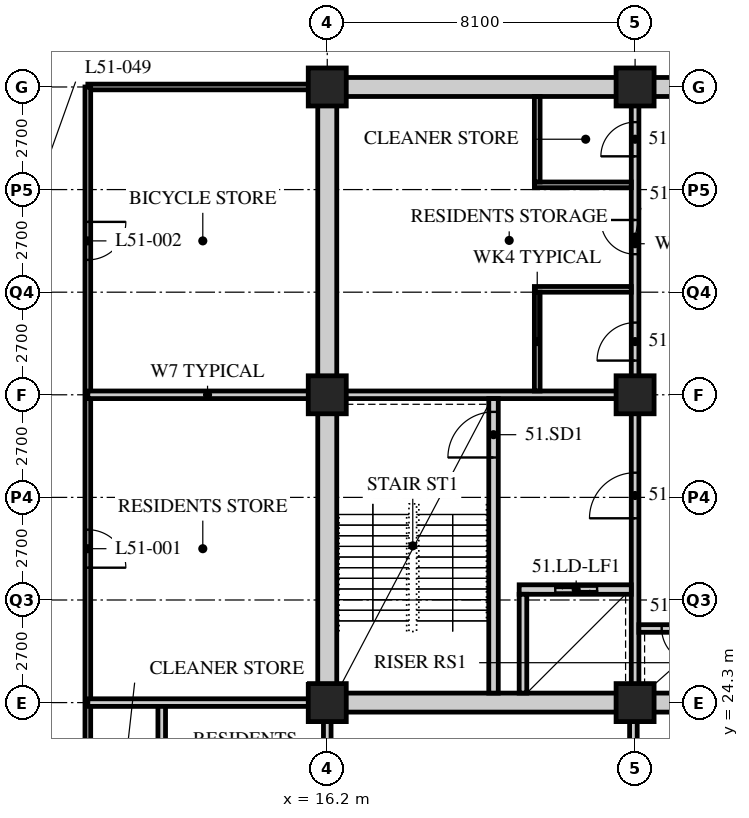
"""IFC4 building model, lengths in metres.
Left out: names, types, materials, properties, quantities, classifications, styles, units other than length and angle.
Written with IfcOpenShell. Run it as: python <this file> out.ifc"""

import sys

from ifc_helpers import new_model, si_unit, direction, frame, frame_2d, origin, origin_2d, place, context, subcontext, project, spatial, rectangle, hollow_rectangle, extrude, element, fill, save


model = new_model("IFC4")
c1 = context("Model", 3, precision=1e-05, world=origin(), true_north=direction((0.0, 1.0)))
c2 = subcontext(c1, "Body", "Model", "MODEL_VIEW")
j1 = project(units=[si_unit("LENGTHUNIT", "METRE"), si_unit("PLANEANGLEUNIT", "RADIAN")], contexts=[c1])
p1 = place(None, origin())
s1 = spatial("IfcSite", under=j1, at=p1, CompositionType="ELEMENT")
p2 = place(p1, origin())
s2 = spatial("IfcBuilding", under=s1, at=p2, CompositionType="ELEMENT")
p3 = place(p2, frame((0.0, 0.0, 199.2)))
s3 = spatial("IfcBuildingStorey", under=s2, at=p3, CompositionType="ELEMENT", Elevation=199.2)
for number, where, z_axis, x_axis in (
    (1, (16.2, 24.3, 0.0), (0.0, 0.0, 1.0), (1.0, 0.0, 0.0)),
    (2, (16.2, 32.4, 0.0), (0.0, 0.0, 1.0), (1.0, 0.0, 0.0)),
    (3, (16.2, 40.5, 0.0), (0.0, 0.0, 1.0), (1.0, 0.0, 0.0)),
    (4, (24.3, 24.3, 0.0), (0.0, 0.0, 1.0), (1.0, 0.0, 0.0)),
    (5, (24.3, 32.4, 0.0), (0.0, 0.0, 1.0), (1.0, 0.0, 0.0)),
    (6, (24.3, 40.5, 0.0), (0.0, 0.0, 1.0), (1.0, 0.0, 0.0)),
):
    element("IfcColumn", number, at=place(p3, frame(where, z_axis=z_axis, x_axis=x_axis)), inside=s3, PredefinedType="COLUMN", context=c2, shape_type="SweptSolid", body=[
        extrude(hollow_rectangle(XDim=1.0, YDim=1.0, WallThickness=0.1, at=origin_2d()), origin(), (0.0, 0.0, 1.0), 3.6),
    ])
p4 = place(p3, frame((16.0, 40.5, 0.0), z_axis=(0.0, 0.0, 1.0), x_axis=(-1.0, 0.0, 0.0)))
e7 = element("IfcWall", 7, at=p4, inside=s3, PredefinedType="PARTITIONING", context=c2, shape_type="SweptSolid", body=[
    extrude(rectangle(XDim=6.1, YDim=0.15, at=frame_2d((3.05, 0.0))), origin(), (0.0, 0.0, 1.0), 3.39),
])
p5 = place(p3, frame((9.9, 40.5, 0.0), z_axis=(0.0, 0.0, 1.0), x_axis=(0.0, -1.0, 0.0)))
e8 = element("IfcWall", 8, at=p5, inside=s3, PredefinedType="PARTITIONING", context=c2, shape_type="SweptSolid", body=[
    extrude(rectangle(XDim=19.8, YDim=0.15, at=frame_2d((9.9, 0.0))), origin(), (0.0, 0.0, 1.0), 3.39),
])
p6 = place(p5, frame((11.65, 0.0, 0.0)))
e9 = element("IfcOpeningElement", 9, at=p6, cuts=e8, PredefinedType="OPENING", context=c2, shape_type="SweptSolid", body=[
    extrude(rectangle(XDim=1.0, YDim=2.1, at=frame_2d((0.5, 1.05))), frame((0.0, 0.085, 0.0), z_axis=(0.0, -1.0, 0.0), x_axis=(1.0, 0.0, 0.0)), (0.0, 0.0, 1.0), 0.17),
])
p7 = place(p5, frame((3.55, 0.0, 0.0)))
e10 = element("IfcOpeningElement", 10, at=p7, cuts=e8, PredefinedType="OPENING", context=c2, shape_type="SweptSolid", body=[
    extrude(rectangle(XDim=1.0, YDim=2.1, at=frame_2d((0.5, 1.05))), frame((0.0, 0.085, 0.0), z_axis=(0.0, -1.0, 0.0), x_axis=(1.0, 0.0, 0.0)), (0.0, 0.0, 1.0), 0.17),
])
p8 = place(p3, frame((9.9, 32.4, 0.0), z_axis=(0.0, 0.0, 1.0), x_axis=(1.0, 0.0, 0.0)))
e11 = element("IfcWall", 11, at=p8, inside=s3, PredefinedType="SOLIDWALL", context=c2, shape_type="SweptSolid", body=[
    extrude(rectangle(XDim=6.3, YDim=0.2, at=frame_2d((3.15, 0.0))), origin(), (0.0, 0.0, 1.0), 3.39),
])
p9 = place(p3, frame((16.2, 20.7, 0.0), z_axis=(0.0, 0.0, 1.0), x_axis=(0.0, 1.0, 0.0)))
e12 = element("IfcWall", 12, at=p9, inside=s3, PredefinedType="SOLIDWALL", context=c2, shape_type="SweptSolid", body=[
    extrude(rectangle(XDim=3.6, YDim=0.2, at=frame_2d((1.8, 0.0))), origin(), (0.0, 0.0, 1.0), 2.778),
])
p10 = place(p3, frame((11.844, 20.7, 0.0), z_axis=(0.0, 0.0, 1.0), x_axis=(0.0, 1.0, 0.0)))
e13 = element("IfcWall", 13, at=p10, inside=s3, PredefinedType="SOLIDWALL", context=c2, shape_type="SweptSolid", body=[
    extrude(rectangle(XDim=3.6, YDim=0.2, at=frame_2d((1.8, 0.0))), origin(), (0.0, 0.0, 1.0), 3.39),
])
p11 = place(p3, frame((24.256, 20.7, 0.0), z_axis=(0.0, 0.0, 1.0), x_axis=(0.0, 1.0, 0.0)))
e14 = element("IfcWall", 14, at=p11, inside=s3, PredefinedType="SOLIDWALL", context=c2, shape_type="SweptSolid", body=[
    extrude(rectangle(XDim=3.6, YDim=0.2, at=frame_2d((1.8, 0.0))), origin(), (0.0, 0.0, 1.0), 2.778),
])
p12 = place(p3, frame((9.9, 24.3, 0.0), z_axis=(0.0, 0.0, 1.0), x_axis=(1.0, 0.0, 0.0)))
e15 = element("IfcWall", 15, at=p12, inside=s3, PredefinedType="SOLIDWALL", context=c2, shape_type="SweptSolid", body=[
    extrude(rectangle(XDim=6.3, YDim=0.2, at=frame_2d((3.15, 0.0))), origin(), (0.0, 0.0, 1.0), 3.39),
])
p13 = place(p3, frame((15.95, 24.3, 0.0), z_axis=(0.0, 0.0, 1.0), x_axis=(1.0, 0.0, 0.0)))
e16 = element("IfcWall", 16, at=p13, inside=s3, PredefinedType="SOLIDWALL", context=c2, shape_type="SweptSolid", body=[
    extrude(rectangle(XDim=24.8, YDim=0.5, at=frame_2d((12.4, 0.0))), origin(), (0.0, 0.0, 1.0), 2.74),
])
p14 = place(p13, frame((11.5, 0.0, 0.0)))
e17 = element("IfcOpeningElement", 17, at=p14, cuts=e16, PredefinedType="OPENING", context=c2, shape_type="SweptSolid", body=[
    extrude(rectangle(XDim=1.8, YDim=2.4, at=frame_2d((0.9, 1.2))), frame((0.0, 0.26, 0.0), z_axis=(0.0, -1.0, 0.0), x_axis=(1.0, 0.0, 0.0)), (0.0, 0.0, 1.0), 0.52),
])
p15 = place(p3, frame((15.95, 40.5, 0.0), z_axis=(0.0, 0.0, 1.0), x_axis=(1.0, 0.0, 0.0)))
e18 = element("IfcWall", 18, at=p15, inside=s3, PredefinedType="SOLIDWALL", context=c2, shape_type="SweptSolid", body=[
    extrude(rectangle(XDim=24.8, YDim=0.5, at=frame_2d((12.4, 0.0))), origin(), (0.0, 0.0, 1.0), 2.74),
])
p16 = place(p15, frame((11.5, 0.0, 0.0)))
e19 = element("IfcOpeningElement", 19, at=p16, cuts=e18, PredefinedType="OPENING", context=c2, shape_type="SweptSolid", body=[
    extrude(rectangle(XDim=1.8, YDim=2.4, at=frame_2d((0.9, 1.2))), frame((0.0, 0.26, 0.0), z_axis=(0.0, -1.0, 0.0), x_axis=(1.0, 0.0, 0.0)), (0.0, 0.0, 1.0), 0.52),
])
p17 = place(p3, frame((16.2, 24.55, 0.0), z_axis=(0.0, 0.0, 1.0), x_axis=(0.0, 1.0, 0.0)))
e20 = element("IfcWall", 20, at=p17, inside=s3, PredefinedType="SOLIDWALL", context=c2, shape_type="SweptSolid", body=[
    extrude(rectangle(XDim=15.7, YDim=0.5, at=frame_2d((7.85, 0.0))), origin(), (0.0, 0.0, 1.0), 2.778),
])
p18 = place(p3, frame((16.45, 32.4, 0.0), z_axis=(0.0, 0.0, 1.0), x_axis=(1.0, 0.0, 0.0)))
e21 = element("IfcWall", 21, at=p18, inside=s3, PredefinedType="SOLIDWALL", context=c2, shape_type="SweptSolid", body=[
    extrude(rectangle(XDim=7.95, YDim=0.2, at=frame_2d((3.975, 0.0))), origin(), (0.0, 0.0, 1.0), 2.778),
])
p19 = place(p3, frame((24.3, 24.55, 0.0), z_axis=(0.0, 0.0, 1.0), x_axis=(0.0, 1.0, 0.0)))
e22 = element("IfcWall", 22, at=p19, inside=s3, PredefinedType="SOLIDWALL", context=c2, shape_type="SweptSolid", body=[
    extrude(rectangle(XDim=7.75, YDim=0.2, at=frame_2d((3.875, 0.0))), origin(), (0.0, 0.0, 1.0), 2.778),
])
p20 = place(p19, frame((4.6, 0.0, 0.0)))
e23 = element("IfcOpeningElement", 23, at=p20, cuts=e22, PredefinedType="OPENING", context=c2, shape_type="SweptSolid", body=[
    extrude(rectangle(XDim=1.2, YDim=2.1, at=frame_2d((0.6, 1.05))), frame((0.0, 0.11, 0.0), z_axis=(0.0, -1.0, 0.0), x_axis=(1.0, 0.0, 0.0)), (0.0, 0.0, 1.0), 0.22),
])
p21 = place(p3, frame((20.575, 24.55, 0.0), z_axis=(0.0, 0.0, 1.0), x_axis=(0.0, 1.0, 0.0)))
e24 = element("IfcWall", 24, at=p21, inside=s3, PredefinedType="SOLIDWALL", context=c2, shape_type="SweptSolid", body=[
    extrude(rectangle(XDim=7.75, YDim=0.25, at=frame_2d((3.875, 0.0))), origin(), (0.0, 0.0, 1.0), 3.39),
])
p22 = place(p21, frame((6.2, 0.0, 0.0)))
e25 = element("IfcOpeningElement", 25, at=p22, cuts=e24, PredefinedType="OPENING", context=c2, shape_type="SweptSolid", body=[
    extrude(rectangle(XDim=1.2, YDim=2.1, at=frame_2d((0.6, 1.05))), frame((0.0, 0.135, 0.0), z_axis=(0.0, -1.0, 0.0), x_axis=(1.0, 0.0, 0.0)), (0.0, 0.0, 1.0), 0.27),
])
p23 = place(p3, frame((21.25, 27.275, 0.0), z_axis=(0.0, 0.0, 1.0), x_axis=(1.0, 0.0, 0.0)))
e26 = element("IfcWall", 26, at=p23, inside=s3, PredefinedType="SOLIDWALL", context=c2, shape_type="SweptSolid", body=[
    extrude(rectangle(XDim=2.95, YDim=0.25, at=frame_2d((1.475, 0.0))), origin(), (0.0, 0.0, 1.0), 3.39),
])
p24 = place(p23, frame((0.95, 0.0, 0.0)))
e27 = element("IfcOpeningElement", 27, at=p24, cuts=e26, PredefinedType="OPENING", context=c2, shape_type="SweptSolid", body=[
    extrude(rectangle(XDim=1.1, YDim=2.4, at=frame_2d((0.55, 1.2))), frame((0.0, 0.135, 0.0), z_axis=(0.0, -1.0, 0.0), x_axis=(1.0, 0.0, 0.0)), (0.0, 0.0, 1.0), 0.27),
])
p25 = place(p3, frame((21.35, 24.55, 0.0), z_axis=(0.0, 0.0, 1.0), x_axis=(0.0, 1.0, 0.0)))
e28 = element("IfcWall", 28, at=p25, inside=s3, PredefinedType="SOLIDWALL", context=c2, shape_type="SweptSolid", body=[
    extrude(rectangle(XDim=2.6, YDim=0.2, at=frame_2d((1.3, 0.0))), origin(), (0.0, 0.0, 1.0), 3.39),
])
p26 = place(p3, frame((24.4, 26.25, 0.0), z_axis=(0.0, 0.0, 1.0), x_axis=(1.0, 0.0, 0.0)))
e29 = element("IfcWall", 29, at=p26, inside=s3, PredefinedType="SOLIDWALL", context=c2, shape_type="SweptSolid", body=[
    extrude(rectangle(XDim=2.15, YDim=0.2, at=frame_2d((1.075, 0.0))), origin(), (0.0, 0.0, 1.0), 3.39),
])
p27 = place(p26, frame((0.6, 0.0, 0.0)))
e30 = element("IfcOpeningElement", 30, at=p27, cuts=e29, PredefinedType="OPENING", context=c2, shape_type="SweptSolid", body=[
    extrude(rectangle(XDim=0.9, YDim=2.1, at=frame_2d((0.45, 1.05))), frame((0.0, 0.11, 0.0), z_axis=(0.0, -1.0, 0.0), x_axis=(1.0, 0.0, 0.0)), (0.0, 0.0, 1.0), 0.22),
])
p28 = place(p3, frame((24.3, 32.5, 0.0), z_axis=(0.0, 0.0, 1.0), x_axis=(0.0, 1.0, 0.0)))
e31 = element("IfcWall", 31, at=p28, inside=s3, PredefinedType="PARTITIONING", context=c2, shape_type="SweptSolid", body=[
    extrude(rectangle(XDim=7.75, YDim=0.2, at=frame_2d((3.875, 0.0))), origin(), (0.0, 0.0, 1.0), 2.778),
])
p29 = place(p28, frame((0.8, 0.0, 0.0)))
e32 = element("IfcOpeningElement", 32, at=p29, cuts=e31, PredefinedType="OPENING", context=c2, shape_type="SweptSolid", body=[
    extrude(rectangle(XDim=1.0, YDim=2.1, at=frame_2d((0.5, 1.05))), frame((0.0, 0.11, 0.0), z_axis=(0.0, -1.0, 0.0), x_axis=(1.0, 0.0, 0.0)), (0.0, 0.0, 1.0), 0.22),
])
p30 = place(p28, frame((3.6, 0.0, 0.0)))
e33 = element("IfcOpeningElement", 33, at=p30, cuts=e31, PredefinedType="OPENING", context=c2, shape_type="SweptSolid", body=[
    extrude(rectangle(XDim=0.9, YDim=2.1, at=frame_2d((0.45, 1.05))), frame((0.0, 0.11, 0.0), z_axis=(0.0, -1.0, 0.0), x_axis=(1.0, 0.0, 0.0)), (0.0, 0.0, 1.0), 0.22),
])
p31 = place(p28, frame((6.175, 0.0, 0.0)))
e34 = element("IfcOpeningElement", 34, at=p31, cuts=e31, PredefinedType="OPENING", context=c2, shape_type="SweptSolid", body=[
    extrude(rectangle(XDim=0.9, YDim=2.1, at=frame_2d((0.45, 1.05))), frame((0.0, 0.11, 0.0), z_axis=(0.0, -1.0, 0.0), x_axis=(1.0, 0.0, 0.0)), (0.0, 0.0, 1.0), 0.22),
])
for number, where, z_axis, x_axis in (
    (35, (21.65, 35.175, 0.0), (0.0, 0.0, 1.0), (1.0, 0.0, 0.0)),
    (36, (21.65, 37.925, 0.0), (0.0, 0.0, 1.0), (1.0, 0.0, 0.0)),
):
    element("IfcWall", number, at=place(p3, frame(where, z_axis=z_axis, x_axis=x_axis)), inside=s3, PredefinedType="PARTITIONING", context=c2, shape_type="SweptSolid", body=[
        extrude(rectangle(XDim=2.55, YDim=0.15, at=frame_2d((1.275, 0.0))), origin(), (0.0, 0.0, 1.0), 3.39),
    ])
p32 = place(p3, frame((21.725, 32.5, 0.0), z_axis=(0.0, 0.0, 1.0), x_axis=(0.0, 1.0, 0.0)))
e37 = element("IfcWall", 37, at=p32, inside=s3, PredefinedType="PARTITIONING", context=c2, shape_type="SweptSolid", body=[
    extrude(rectangle(XDim=2.6, YDim=0.15, at=frame_2d((1.3, 0.0))), origin(), (0.0, 0.0, 1.0), 3.39),
])
p33 = place(p3, frame((21.725, 38.0, 0.0), z_axis=(0.0, 0.0, 1.0), x_axis=(0.0, 1.0, 0.0)))
e38 = element("IfcWall", 38, at=p33, inside=s3, PredefinedType="PARTITIONING", context=c2, shape_type="SweptSolid", body=[
    extrude(rectangle(XDim=2.25, YDim=0.15, at=frame_2d((1.125, 0.0))), origin(), (0.0, 0.0, 1.0), 3.39),
])
p34 = place(p6, origin())
e39 = element("IfcDoor", 39, at=p34, inside=s3, OperationType="SINGLE_SWING_RIGHT", PredefinedType="DOOR", context=c2, shape_type="SweptSolid", body=[
    extrude(rectangle(XDim=1.0, YDim=2.1, at=frame_2d((0.5, 1.05))), frame((0.0, 0.025, 0.0), z_axis=(0.0, -1.0, 0.0), x_axis=(1.0, 0.0, 0.0)), (0.0, 0.0, 1.0), 0.05),
])
fill(e9, e39)
p35 = place(p7, origin())
e40 = element("IfcDoor", 40, at=p35, inside=s3, OperationType="SINGLE_SWING_LEFT", PredefinedType="DOOR", context=c2, shape_type="SweptSolid", body=[
    extrude(rectangle(XDim=1.0, YDim=2.1, at=frame_2d((0.5, 1.05))), frame((0.0, 0.025, 0.0), z_axis=(0.0, -1.0, 0.0), x_axis=(1.0, 0.0, 0.0)), (0.0, 0.0, 1.0), 0.05),
])
fill(e10, e40)
p36 = place(p29, origin())
e41 = element("IfcDoor", 41, at=p36, inside=s3, OperationType="SINGLE_SWING_LEFT", PredefinedType="DOOR", context=c2, shape_type="SweptSolid", body=[
    extrude(rectangle(XDim=1.0, YDim=2.1, at=frame_2d((0.5, 1.05))), frame((0.0, 0.025, 0.0), z_axis=(0.0, -1.0, 0.0), x_axis=(1.0, 0.0, 0.0)), (0.0, 0.0, 1.0), 0.05),
])
fill(e32, e41)
p37 = place(p30, origin())
e42 = element("IfcDoor", 42, at=p37, inside=s3, OperationType="SINGLE_SWING_RIGHT", PredefinedType="DOOR", context=c2, shape_type="SweptSolid", body=[
    extrude(rectangle(XDim=0.9, YDim=2.1, at=frame_2d((0.45, 1.05))), frame((0.0, 0.025, 0.0), z_axis=(0.0, -1.0, 0.0), x_axis=(1.0, 0.0, 0.0)), (0.0, 0.0, 1.0), 0.05),
])
fill(e33, e42)
p38 = place(p31, origin())
e43 = element("IfcDoor", 43, at=p38, inside=s3, OperationType="SINGLE_SWING_LEFT", PredefinedType="DOOR", context=c2, shape_type="SweptSolid", body=[
    extrude(rectangle(XDim=0.9, YDim=2.1, at=frame_2d((0.45, 1.05))), frame((0.0, 0.025, 0.0), z_axis=(0.0, -1.0, 0.0), x_axis=(1.0, 0.0, 0.0)), (0.0, 0.0, 1.0), 0.05),
])
fill(e34, e43)
p39 = place(p22, origin())
e44 = element("IfcDoor", 44, at=p39, inside=s3, OperationType="SINGLE_SWING_LEFT", PredefinedType="DOOR", context=c2, shape_type="SweptSolid", body=[
    extrude(rectangle(XDim=1.2, YDim=2.1, at=frame_2d((0.6, 1.05))), frame((0.0, 0.025, 0.0), z_axis=(0.0, -1.0, 0.0), x_axis=(1.0, 0.0, 0.0)), (0.0, 0.0, 1.0), 0.05),
])
fill(e25, e44)
p40 = place(p20, origin())
e45 = element("IfcDoor", 45, at=p40, inside=s3, OperationType="SINGLE_SWING_LEFT", PredefinedType="DOOR", context=c2, shape_type="SweptSolid", body=[
    extrude(rectangle(XDim=1.2, YDim=2.1, at=frame_2d((0.6, 1.05))), frame((0.0, 0.025, 0.0), z_axis=(0.0, -1.0, 0.0), x_axis=(1.0, 0.0, 0.0)), (0.0, 0.0, 1.0), 0.05),
])
fill(e23, e45)
p41 = place(p27, origin())
e46 = element("IfcDoor", 46, at=p41, inside=s3, OperationType="SINGLE_SWING_LEFT", PredefinedType="DOOR", context=c2, shape_type="SweptSolid", body=[
    extrude(rectangle(XDim=0.9, YDim=2.1, at=frame_2d((0.45, 1.05))), frame((0.0, 0.025, 0.0), z_axis=(0.0, -1.0, 0.0), x_axis=(1.0, 0.0, 0.0)), (0.0, 0.0, 1.0), 0.05),
])
fill(e30, e46)
p42 = place(p24, origin())
e47 = element("IfcDoor", 47, at=p42, inside=s3, OperationType="DOUBLE_DOOR_SLIDING", PredefinedType="DOOR", context=c2, shape_type="SweptSolid", body=[
    extrude(rectangle(XDim=1.1, YDim=2.4, at=frame_2d((0.55, 1.2))), frame((0.0, 0.025, 0.0), z_axis=(0.0, -1.0, 0.0), x_axis=(1.0, 0.0, 0.0)), (0.0, 0.0, 1.0), 0.05),
])
fill(e27, e47)
save(model, sys.argv[1])
